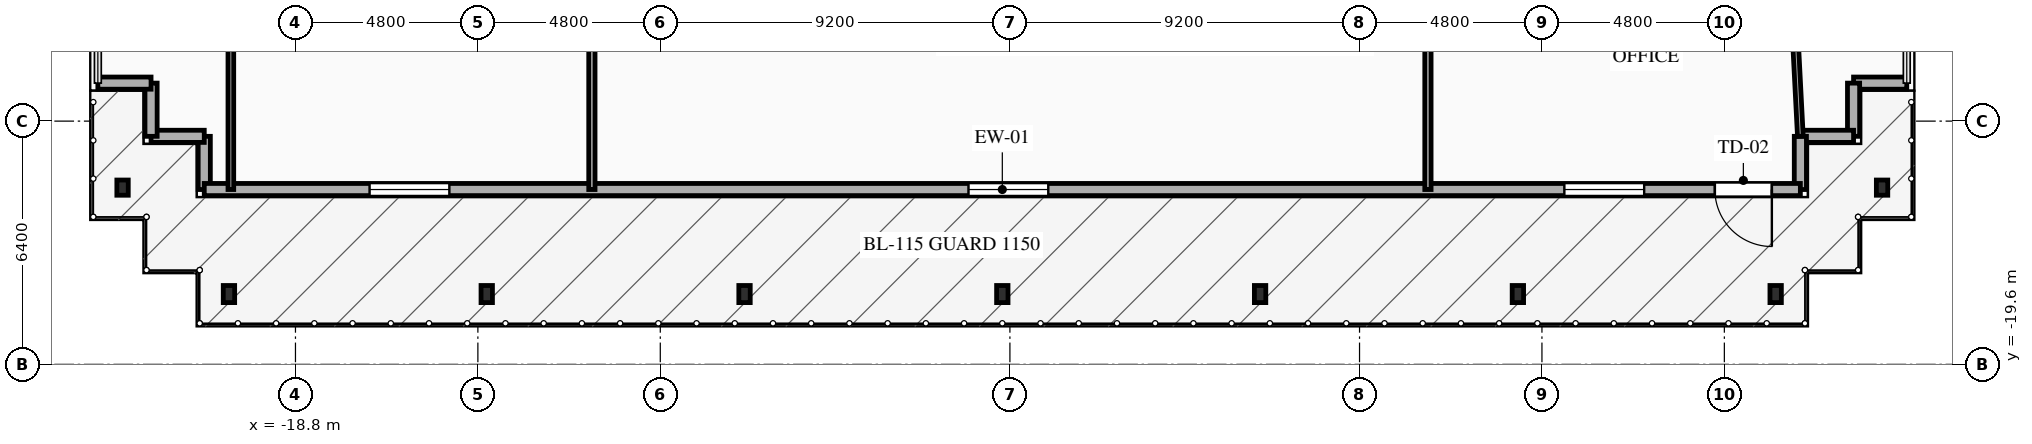
"""IFC4 building model, lengths in metres.
Left out: names, types, materials, properties, quantities, classifications, styles, units other than length and angle.
Written with IfcOpenShell. Run it as: python <this file> out.ifc"""

import sys

from ifc_helpers import new_model, si_unit, direction, frame, frame_2d, origin, origin_2d, place, context, subcontext, project, spatial, rectangle, i_section, extrude, element, fill, save


model = new_model("IFC4")
c1 = context("Model", 3, precision=1e-05, world=origin(), true_north=direction((0.0, 1.0)))
c2 = subcontext(c1, "Body", "Model", "MODEL_VIEW")
j1 = project(units=[si_unit("LENGTHUNIT", "METRE"), si_unit("PLANEANGLEUNIT", "RADIAN")], contexts=[c1])
p1 = place(None, origin())
s1 = spatial("IfcSite", under=j1, at=p1, CompositionType="ELEMENT")
p2 = place(p1, origin())
s2 = spatial("IfcBuilding", under=s1, at=p2, CompositionType="ELEMENT")
p3 = place(p2, frame((0.0, 0.0, 261.8)))
s3 = spatial("IfcBuildingStorey", under=s2, at=p3, CompositionType="ELEMENT", Elevation=261.8)
for number, where, z_axis, x_axis in (
    (1, (-20.55, -17.75, 0.0), (0.0, 0.0, 1.0), (1.0, 0.0, 0.0)),
    (2, (-13.767, -17.75, 0.0), (0.0, 0.0, 1.0), (1.0, 0.0, 0.0)),
    (3, (-6.983, -17.75, 0.0), (0.0, 0.0, 1.0), (1.0, 0.0, 0.0)),
    (4, (-0.2, -17.75, 0.0), (0.0, 0.0, 1.0), (1.0, 0.0, 0.0)),
    (5, (6.583, -17.75, 0.0), (0.0, 0.0, 1.0), (1.0, 0.0, 0.0)),
    (6, (13.367, -17.75, 0.0), (0.0, 0.0, 1.0), (1.0, 0.0, 0.0)),
    (7, (20.15, -17.75, 0.0), (0.0, 0.0, 1.0), (1.0, 0.0, 0.0)),
):
    element("IfcColumn", number, at=place(p3, frame(where, z_axis=z_axis, x_axis=x_axis)), inside=s3, PredefinedType="COLUMN", context=c2, shape_type="SweptSolid", body=[
        extrude(i_section(OverallWidth=0.3, OverallDepth=0.45, WebThickness=0.014, FlangeThickness=0.026, FilletRadius=0.027, at=origin_2d()), origin(), (0.0, 0.0, 1.0), 4.2),
    ])
for number, where, z_axis, x_axis in (
    (8, (22.95, -14.95, 0.0), (0.0, 0.0, 1.0), (1.0, 0.0, 0.0)),
    (9, (-23.35, -14.95, 0.0), (0.0, 0.0, 1.0), (1.0, 0.0, 0.0)),
):
    element("IfcColumn", number, at=place(p3, frame(where, z_axis=z_axis, x_axis=x_axis)), inside=s3, PredefinedType="COLUMN", context=c2, shape_type="SweptSolid", body=[
        extrude(i_section(OverallWidth=0.3, OverallDepth=0.4, WebThickness=0.013, FlangeThickness=0.024, FilletRadius=0.027, at=origin_2d()), origin(), (0.0, 0.0, 1.0), 4.2),
    ])
p4 = place(p3, frame((-21.2, -15.0, 0.0), z_axis=(0.0, 0.0, 1.0), x_axis=(0.0, 1.0, 0.0)))
e10 = element("IfcWall", 10, at=p4, inside=s3, PredefinedType="SOLIDWALL", context=c2, shape_type="SweptSolid", body=[
    extrude(rectangle(XDim=1.4, YDim=0.32, at=frame_2d((0.7, 0.0))), origin(), (0.0, 0.0, 1.0), 3.78),
])
for number, where, z_axis, x_axis in (
    (11, (-21.2, -13.6, 0.0), (0.0, 0.0, 1.0), (-1.0, 0.0, 0.0)),
    (12, (-22.6, -13.6, 0.0), (0.0, 0.0, 1.0), (0.0, 1.0, 0.0)),
):
    element("IfcWall", number, at=place(p3, frame(where, z_axis=z_axis, x_axis=x_axis)), inside=s3, PredefinedType="SOLIDWALL", context=c2, shape_type="SweptSolid", body=[
        extrude(rectangle(XDim=1.4, YDim=0.32, at=frame_2d((0.7, 0.0))), origin(), (0.0, 0.0, 1.0), 3.78),
    ])
p5 = place(p3, frame((-22.6, -12.2, 0.0), z_axis=(0.0, 0.0, 1.0), x_axis=(-1.0, 0.0, 0.0)))
e13 = element("IfcWall", 13, at=p5, inside=s3, PredefinedType="SOLIDWALL", context=c2, shape_type="SweptSolid", body=[
    extrude(rectangle(XDim=1.4, YDim=0.32, at=frame_2d((0.7, 0.0))), origin(), (0.0, 0.0, 1.0), 3.78),
])
for number, where, z_axis, x_axis in (
    (14, (23.6, -12.2, 0.0), (0.0, 0.0, 1.0), (-1.0, 0.0, 0.0)),
    (15, (22.2, -12.2, 0.0), (0.0, 0.0, 1.0), (0.0, -1.0, 0.0)),
):
    element("IfcWall", number, at=place(p3, frame(where, z_axis=z_axis, x_axis=x_axis)), inside=s3, PredefinedType="SOLIDWALL", context=c2, shape_type="SweptSolid", body=[
        extrude(rectangle(XDim=1.4, YDim=0.32, at=frame_2d((0.7, 0.0))), origin(), (0.0, 0.0, 1.0), 3.78),
    ])
for number, where, z_axis, x_axis in (
    (16, (22.2, -13.6, 0.0), (0.0, 0.0, 1.0), (-1.0, 0.0, 0.0)),
    (17, (20.8, -13.6, 0.0), (0.0, 0.0, 1.0), (0.0, -1.0, 0.0)),
):
    element("IfcWall", number, at=place(p3, frame(where, z_axis=z_axis, x_axis=x_axis)), inside=s3, PredefinedType="SOLIDWALL", context=c2, shape_type="SweptSolid", body=[
        extrude(rectangle(XDim=1.4, YDim=0.32, at=frame_2d((0.7, 0.0))), origin(), (0.0, 0.0, 1.0), 3.78),
    ])
p6 = place(p3, frame((20.8, -15.0, 0.0), z_axis=(0.0, 0.0, 1.0), x_axis=(-1.0, 0.0, 0.0)))
e18 = element("IfcWall", 18, at=p6, inside=s3, PredefinedType="SOLIDWALL", context=c2, shape_type="SweptSolid", body=[
    extrude(rectangle(XDim=42.0, YDim=0.32, at=frame_2d((21.0, 0.0))), origin(), (0.0, 0.0, 1.0), 3.78),
])
p7 = place(p6, frame((0.75, 0.0, 0.0)))
e19 = element("IfcOpeningElement", 19, at=p7, cuts=e18, PredefinedType="OPENING", context=c2, shape_type="SweptSolid", body=[
    extrude(rectangle(XDim=1.5, YDim=2.2, at=frame_2d((0.75, 1.1))), frame((0.0, 0.17, 0.0), z_axis=(0.0, -1.0, 0.0), x_axis=(1.0, 0.0, 0.0)), (0.0, 0.0, 1.0), 0.34),
])
p8 = place(p6, frame((4.11, 0.0, 0.75)))
e20 = element("IfcOpeningElement", 20, at=p8, cuts=e18, PredefinedType="OPENING", context=c2, shape_type="SweptSolid", body=[
    extrude(rectangle(XDim=2.1, YDim=2.3, at=frame_2d((1.05, 1.15))), frame((0.0, 0.17, 0.0), z_axis=(0.0, -1.0, 0.0), x_axis=(1.0, 0.0, 0.0)), (0.0, 0.0, 1.0), 0.34),
])
p9 = place(p6, frame((19.79, 0.0, 0.75)))
e21 = element("IfcOpeningElement", 21, at=p9, cuts=e18, PredefinedType="OPENING", context=c2, shape_type="SweptSolid", body=[
    extrude(rectangle(XDim=2.1, YDim=2.3, at=frame_2d((1.05, 1.15))), frame((0.0, 0.17, 0.0), z_axis=(0.0, -1.0, 0.0), x_axis=(1.0, 0.0, 0.0)), (0.0, 0.0, 1.0), 0.34),
])
p10 = place(p6, frame((35.55, 0.0, 0.75)))
e22 = element("IfcOpeningElement", 22, at=p10, cuts=e18, PredefinedType="OPENING", context=c2, shape_type="SweptSolid", body=[
    extrude(rectangle(XDim=2.1, YDim=2.3, at=frame_2d((1.05, 1.15))), frame((0.0, 0.17, 0.0), z_axis=(0.0, -1.0, 0.0), x_axis=(1.0, 0.0, 0.0)), (0.0, 0.0, 1.0), 0.34),
])
for number, where, z_axis, x_axis in (
    (23, (-11.0, -15.0, 0.0), (0.0, 0.0, 1.0), (0.0, 1.0, 0.0)),
    (24, (11.0, -7.75, 0.0), (0.0, 0.0, 1.0), (0.0, -1.0, 0.0)),
):
    element("IfcWall", number, at=place(p3, frame(where, z_axis=z_axis, x_axis=x_axis)), inside=s3, PredefinedType="PARTITIONING", context=c2, shape_type="SweptSolid", body=[
        extrude(rectangle(XDim=7.25, YDim=0.165, at=frame_2d((3.625, 0.0))), origin(), (0.0, 0.0, 1.0), 3.78),
    ])
p11 = place(p3, frame((-20.5, -15.0, 0.0), z_axis=(0.0, 0.0, 1.0), x_axis=(0.0, 1.0, 0.0)))
e25 = element("IfcWall", 25, at=p11, inside=s3, PredefinedType="PARTITIONING", context=c2, shape_type="SweptSolid", body=[
    extrude(rectangle(XDim=7.25, YDim=0.15, at=frame_2d((3.625, 0.0))), origin(), (0.0, 0.0, 1.0), 3.78),
])
p12 = place(p3, frame((20.5, -7.75, 0.0), z_axis=(0.0, 0.0, 1.0), x_axis=(0.05122221301, -0.998687280831, 0.0)))
e26 = element("IfcWall", 26, at=p12, inside=s3, PredefinedType="PARTITIONING", context=c2, shape_type="SweptSolid", body=[
    extrude(rectangle(XDim=5.858, YDim=0.15, at=frame_2d((2.929, 0.0))), origin(), (0.0, 0.0, 1.0), 3.78),
])
p13 = place(p7, origin())
e27 = element("IfcDoor", 27, at=p13, inside=s3, OperationType="SINGLE_SWING_LEFT", PredefinedType="DOOR", context=c2, shape_type="SweptSolid", body=[
    extrude(rectangle(XDim=1.5, YDim=2.2, at=frame_2d((0.75, 1.1))), frame((0.0, 0.025, 0.0), z_axis=(0.0, -1.0, 0.0), x_axis=(1.0, 0.0, 0.0)), (0.0, 0.0, 1.0), 0.05),
])
fill(e19, e27)
p14 = place(p8, origin())
e28 = element("IfcWindow", 28, at=p14, inside=s3, PartitioningType="SINGLE_PANEL", PredefinedType="WINDOW", context=c2, shape_type="SweptSolid", body=[
    extrude(rectangle(XDim=2.1, YDim=2.3, at=frame_2d((1.05, 1.15))), frame((0.0, 0.03, 0.0), z_axis=(0.0, -1.0, 0.0), x_axis=(1.0, 0.0, 0.0)), (0.0, 0.0, 1.0), 0.06),
])
fill(e20, e28)
p15 = place(p9, origin())
e29 = element("IfcWindow", 29, at=p15, inside=s3, PartitioningType="SINGLE_PANEL", PredefinedType="WINDOW", context=c2, shape_type="SweptSolid", body=[
    extrude(rectangle(XDim=2.1, YDim=2.3, at=frame_2d((1.05, 1.15))), frame((0.0, 0.03, 0.0), z_axis=(0.0, -1.0, 0.0), x_axis=(1.0, 0.0, 0.0)), (0.0, 0.0, 1.0), 0.06),
])
fill(e21, e29)
p16 = place(p10, origin())
e30 = element("IfcWindow", 30, at=p16, inside=s3, PartitioningType="SINGLE_PANEL", PredefinedType="WINDOW", context=c2, shape_type="SweptSolid", body=[
    extrude(rectangle(XDim=2.1, YDim=2.3, at=frame_2d((1.05, 1.15))), frame((0.0, 0.03, 0.0), z_axis=(0.0, -1.0, 0.0), x_axis=(1.0, 0.0, 0.0)), (0.0, 0.0, 1.0), 0.06),
])
fill(e22, e30)
save(model, sys.argv[1])
